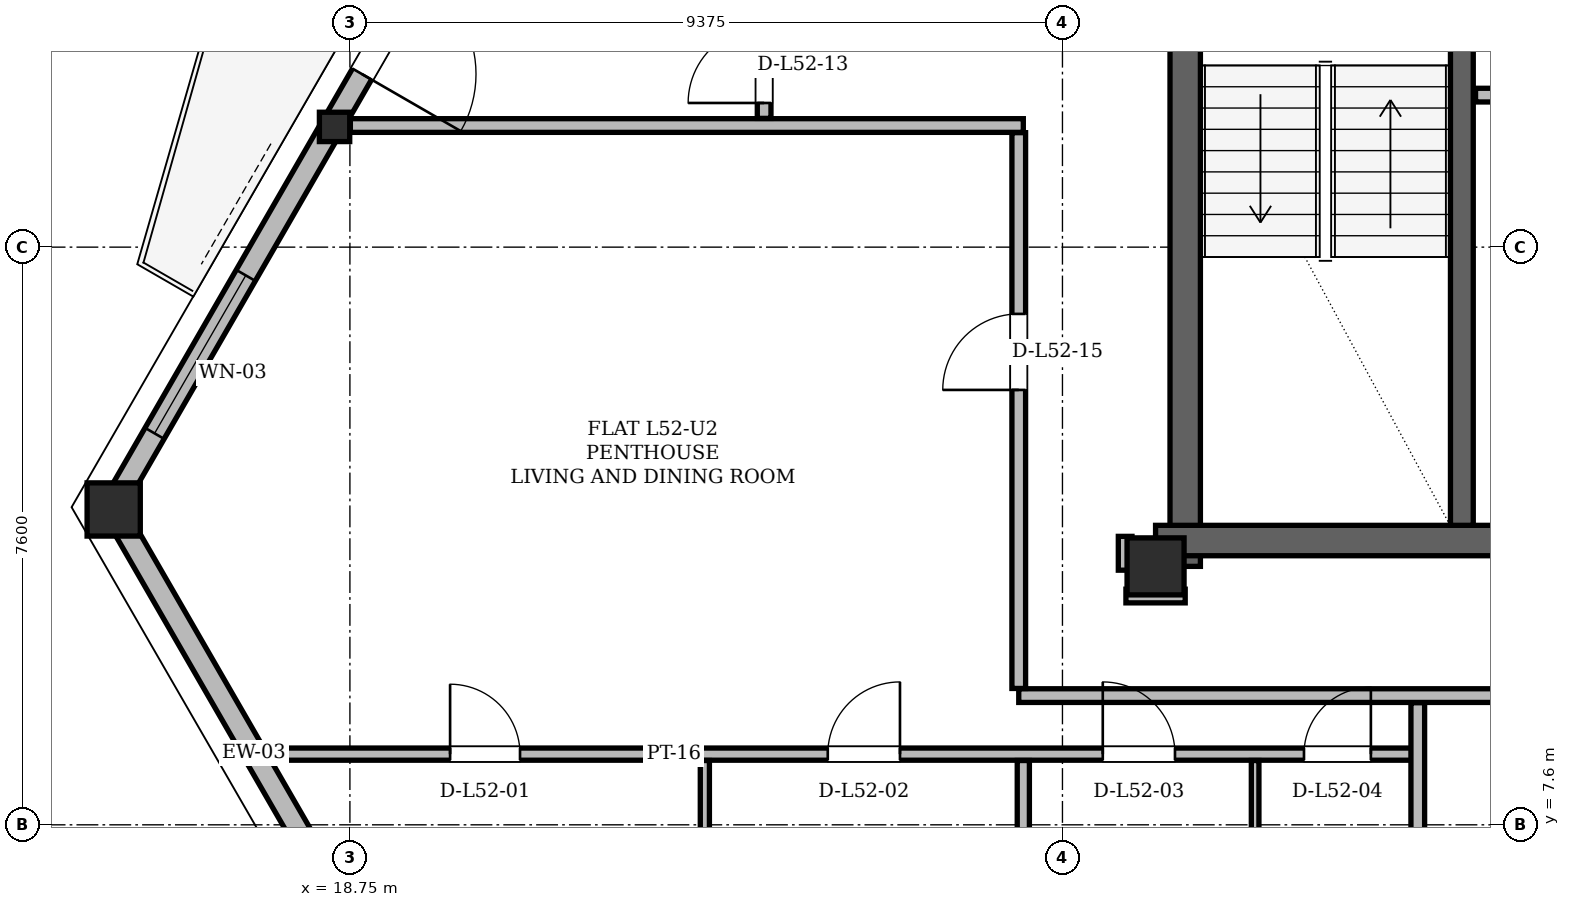
"""IFC4 building model, lengths in metres.
Left out: names, types, materials, properties, quantities, classifications, styles, units other than length and angle.
Written with IfcOpenShell. Run it as: python <this file> out.ifc"""

import sys

from ifc_helpers import new_model, si_unit, direction, frame, frame_2d, origin, origin_2d, place, context, subcontext, project, spatial, rectangle, hollow_rectangle, i_section, extrude, element, fill, save


model = new_model("IFC4")
c1 = context("Model", 3, precision=1e-05, world=origin(), true_north=direction((0.0, 1.0)))
c2 = subcontext(c1, "Body", "Model", "MODEL_VIEW")
j1 = project(units=[si_unit("LENGTHUNIT", "METRE"), si_unit("PLANEANGLEUNIT", "RADIAN")], contexts=[c1])
p1 = place(None, origin())
s1 = spatial("IfcSite", under=j1, at=p1, CompositionType="ELEMENT")
p2 = place(p1, origin())
s2 = spatial("IfcBuilding", under=s1, at=p2, CompositionType="ELEMENT")
p3 = place(p2, frame((0.0, 0.0, 197.4)))
s3 = spatial("IfcBuildingStorey", under=s2, at=p3, CompositionType="ELEMENT", Elevation=197.4)
p4 = place(p3, frame((29.35, 11.0, 0.0), z_axis=(0.0, 0.0, 1.0), x_axis=(1.0, 0.0, 0.0)))
e1 = element("IfcColumn", 1, at=p4, inside=s3, PredefinedType="COLUMN", context=c2, shape_type="SweptSolid", body=[
    extrude(hollow_rectangle(XDim=0.75, YDim=0.75, WallThickness=0.06, at=origin_2d()), origin(), (0.0, 0.0, 1.0), 3.6),
])
p5 = place(p3, frame((15.619, 11.779, 0.005), z_axis=(0.012642540595, -0.016720779496, 0.999780266709), x_axis=(0.797659331282, 0.603108274872, 0.0)))
e2 = element("IfcColumn", 2, at=p5, inside=s3, PredefinedType="COLUMN", context=c2, shape_type="SweptSolid", body=[
    extrude(hollow_rectangle(XDim=0.7, YDim=0.7, WallThickness=0.055, at=origin_2d()), origin(), (0.0, 0.0, 1.0), 3.592),
])
p6 = place(p3, frame((18.523, 16.808, 0.005), z_axis=(0.013934245024, -0.014410048513, 0.999799073473), x_axis=(0.718875400752, 0.69513894884, 0.0)))
e3 = element("IfcColumn", 3, at=p6, inside=s3, PredefinedType="COLUMN", context=c2, shape_type="SweptSolid", body=[
    extrude(i_section(OverallWidth=0.399, OverallDepth=0.386, WebThickness=0.021, FlangeThickness=0.033, at=origin_2d()), origin(), (0.0, 0.0, 1.0), 3.592),
])
p7 = place(p3, frame((29.74, 11.0, 0.0), z_axis=(0.0, 0.0, 1.0), x_axis=(0.0, 1.0, 0.0)))
e4 = element("IfcWall", 4, at=p7, inside=s3, PredefinedType="SHEAR", context=c2, shape_type="SweptSolid", body=[
    extrude(rectangle(XDim=13.3, YDim=0.4, at=frame_2d((6.65, 0.0))), origin(), (0.0, 0.0, 1.0), 3.38),
])
p8 = place(p3, frame((29.35, 11.34, 0.0), z_axis=(0.0, 0.0, 1.0), x_axis=(1.0, 0.0, 0.0)))
e5 = element("IfcWall", 5, at=p8, inside=s3, PredefinedType="SHEAR", context=c2, shape_type="SweptSolid", body=[
    extrude(rectangle(XDim=7.1, YDim=0.4, at=frame_2d((3.55, 0.0))), origin(), (0.0, 0.0, 1.0), 3.38),
])
p9 = place(p3, frame((33.38, 11.54, 0.0), z_axis=(0.0, 0.0, 1.0), x_axis=(0.0, 1.0, 0.0)))
e6 = element("IfcWall", 6, at=p9, inside=s3, PredefinedType="SHEAR", context=c2, shape_type="SweptSolid", body=[
    extrude(rectangle(XDim=7.62, YDim=0.3, at=frame_2d((3.81, 0.0))), origin(), (0.0, 0.0, 1.0), 3.38),
])
p10 = place(p3, frame((15.619, 11.779, 0.0), z_axis=(0.0, 0.0, 1.0), x_axis=(0.499999788377, -0.866025525965, 0.0)))
e7 = element("IfcWall", 7, at=p10, inside=s3, PredefinedType="SOLIDWALL", context=c2, shape_type="SweptSolid", body=[
    extrude(rectangle(XDim=7.468, YDim=0.29, at=frame_2d((3.734, 0.0))), origin(), (0.0, 0.0, 1.0), 2.677),
])
p11 = place(p3, frame((33.766, 43.21, 0.0), z_axis=(0.0, 0.0, 1.0), x_axis=(-0.499998847915, -0.86602606894, 0.0)))
e8 = element("IfcWall", 8, at=p11, inside=s3, PredefinedType="SOLIDWALL", context=c2, shape_type="SweptSolid", body=[
    extrude(rectangle(XDim=36.293, YDim=0.29, at=frame_2d((18.147, 0.0))), origin(), (0.0, 0.0, 1.0), 2.677),
])
p12 = place(p11, frame((8.034, 0.0, 0.0)))
e9 = element("IfcOpeningElement", 9, at=p12, cuts=e8, PredefinedType="OPENING", context=c2, shape_type="SweptSolid", body=[
    extrude(rectangle(XDim=1.5, YDim=2.2, at=frame_2d((0.75, 1.1))), frame((0.0, 0.145, 0.0), z_axis=(0.0, -1.0, 0.0), x_axis=(1.0, 0.0, 0.0)), (0.0, 0.0, 1.0), 0.29),
])
p13 = place(p11, frame((28.214, 0.0, 0.0)))
e10 = element("IfcOpeningElement", 10, at=p13, cuts=e8, PredefinedType="OPENING", context=c2, shape_type="SweptSolid", body=[
    extrude(rectangle(XDim=1.5, YDim=2.2, at=frame_2d((0.75, 1.1))), frame((0.0, 0.145, 0.0), z_axis=(0.0, -1.0, 0.0), x_axis=(1.0, 0.0, 0.0)), (0.0, 0.0, 1.0), 0.29),
])
p14 = place(p11, frame((32.772, 0.0, 0.85)))
e11 = element("IfcOpeningElement", 11, at=p14, cuts=e8, PredefinedType="OPENING", context=c2, shape_type="SweptSolid", body=[
    extrude(rectangle(XDim=2.4, YDim=1.717, at=frame_2d((1.2, 0.858))), frame((0.0, 0.145, 0.0), z_axis=(0.0, -1.0, 0.0), x_axis=(1.0, 0.0, 0.0)), (0.0, 0.0, 1.0), 0.29),
])
p15 = place(p11, frame((21.96, 0.0, 0.85)))
e12 = element("IfcOpeningElement", 12, at=p15, cuts=e8, PredefinedType="OPENING", context=c2, shape_type="SweptSolid", body=[
    extrude(rectangle(XDim=2.0, YDim=1.717, at=frame_2d((1.0, 0.858))), frame((0.0, 0.145, 0.0), z_axis=(0.0, -1.0, 0.0), x_axis=(1.0, 0.0, 0.0)), (0.0, 0.0, 1.0), 0.29),
])
p16 = place(p11, frame((2.382, 0.0, 0.85)))
e13 = element("IfcOpeningElement", 13, at=p16, cuts=e8, PredefinedType="OPENING", context=c2, shape_type="SweptSolid", body=[
    extrude(rectangle(XDim=1.6, YDim=1.7, at=frame_2d((0.8, 0.85))), frame((0.0, 0.145, 0.0), z_axis=(0.0, -1.0, 0.0), x_axis=(1.0, 0.0, 0.0)), (0.0, 0.0, 1.0), 0.29),
])
p17 = place(p11, frame((13.34, 0.0, 0.85)))
e14 = element("IfcOpeningElement", 14, at=p17, cuts=e8, PredefinedType="OPENING", context=c2, shape_type="SweptSolid", body=[
    extrude(rectangle(XDim=3.0, YDim=1.717, at=frame_2d((1.5, 0.858))), frame((0.0, 0.145, 0.0), z_axis=(0.0, -1.0, 0.0), x_axis=(1.0, 0.0, 0.0)), (0.0, 0.0, 1.0), 0.29),
])
p18 = place(p3, frame((33.56, 17.2, 0.0), z_axis=(0.0, 0.0, 1.0), x_axis=(1.0, 0.0, 0.0)))
e15 = element("IfcWall", 15, at=p18, inside=s3, PredefinedType="PARTITIONING", context=c2, shape_type="SweptSolid", body=[
    extrude(rectangle(XDim=2.66, YDim=0.18, at=frame_2d((1.33, 0.0))), origin(), (0.0, 0.0, 1.0), 3.38),
])
p19 = place(p3, frame((17.667, 8.53, 0.0), z_axis=(0.0, 0.0, 1.0), x_axis=(1.0, 0.0, 0.0)))
e16 = element("IfcWall", 16, at=p19, inside=s3, PredefinedType="PARTITIONING", context=c2, shape_type="SweptSolid", body=[
    extrude(rectangle(XDim=15.183, YDim=0.16, at=frame_2d((7.592, 0.0))), origin(), (0.0, 0.0, 1.0), 2.913),
])
p20 = place(p19, frame((2.401, 0.0, 0.0)))
e17 = element("IfcOpeningElement", 17, at=p20, cuts=e16, PredefinedType="OPENING", context=c2, shape_type="SweptSolid", body=[
    extrude(rectangle(XDim=0.92, YDim=2.12, at=frame_2d((0.46, 1.06))), frame((0.0, 0.08, 0.0), z_axis=(0.0, -1.0, 0.0), x_axis=(1.0, 0.0, 0.0)), (0.0, 0.0, 1.0), 0.16),
])
p21 = place(p19, frame((7.37, 0.0, 0.0)))
e18 = element("IfcOpeningElement", 18, at=p21, cuts=e16, PredefinedType="OPENING", context=c2, shape_type="SweptSolid", body=[
    extrude(rectangle(XDim=0.95, YDim=2.1, at=frame_2d((0.475, 1.05))), frame((0.0, 0.08, 0.0), z_axis=(0.0, -1.0, 0.0), x_axis=(1.0, 0.0, 0.0)), (0.0, 0.0, 1.0), 0.16),
])
p22 = place(p19, frame((10.988, 0.0, 0.0)))
e19 = element("IfcOpeningElement", 19, at=p22, cuts=e16, PredefinedType="OPENING", context=c2, shape_type="SweptSolid", body=[
    extrude(rectangle(XDim=0.95, YDim=2.1, at=frame_2d((0.475, 1.05))), frame((0.0, 0.08, 0.0), z_axis=(0.0, -1.0, 0.0), x_axis=(1.0, 0.0, 0.0)), (0.0, 0.0, 1.0), 0.16),
])
p23 = place(p19, frame((13.636, 0.0, 0.0)))
e20 = element("IfcOpeningElement", 20, at=p23, cuts=e16, PredefinedType="OPENING", context=c2, shape_type="SweptSolid", body=[
    extrude(rectangle(XDim=0.88, YDim=2.08, at=frame_2d((0.44, 1.04))), frame((0.0, 0.08, 0.0), z_axis=(0.0, -1.0, 0.0), x_axis=(1.0, 0.0, 0.0)), (0.0, 0.0, 1.0), 0.16),
])
p24 = place(p3, frame((27.55, 9.3, 0.0), z_axis=(0.0, 0.0, 1.0), x_axis=(1.0, 0.0, 0.0)))
e21 = element("IfcWall", 21, at=p24, inside=s3, PredefinedType="PARTITIONING", context=c2, shape_type="SweptSolid", body=[
    extrude(rectangle(XDim=21.25, YDim=0.18, at=frame_2d((10.625, 0.0))), origin(), (0.0, 0.0, 1.0), 2.913),
])
p25 = place(p24, frame((7.1, 0.0, 0.0)))
e22 = element("IfcOpeningElement", 22, at=p25, cuts=e21, PredefinedType="OPENING", context=c2, shape_type="SweptSolid", body=[
    extrude(rectangle(XDim=1.3, YDim=2.2, at=frame_2d((0.65, 1.1))), frame((0.0, 0.09, 0.0), z_axis=(0.0, -1.0, 0.0), x_axis=(1.0, 0.0, 0.0)), (0.0, 0.0, 1.0), 0.18),
])
p26 = place(p24, frame((18.52, 0.0, 0.0)))
e23 = element("IfcOpeningElement", 23, at=p26, cuts=e21, PredefinedType="OPENING", context=c2, shape_type="SweptSolid", body=[
    extrude(rectangle(XDim=1.0, YDim=2.18, at=frame_2d((0.5, 1.09))), frame((0.0, 0.09, 0.0), z_axis=(0.0, -1.0, 0.0), x_axis=(1.0, 0.0, 0.0)), (0.0, 0.0, 1.0), 0.18),
])
p27 = place(p3, frame((28.96, 10.61, 0.0), z_axis=(0.0, 0.0, 1.0), x_axis=(1.0, 0.0, 0.0)))
e24 = element("IfcWall", 24, at=p27, inside=s3, PredefinedType="PARTITIONING", context=c2, shape_type="SweptSolid", body=[
    extrude(rectangle(XDim=0.78, YDim=0.18, at=frame_2d((0.39, 0.0))), origin(), (0.0, 0.0, 1.0), 3.38),
])
p28 = place(p3, frame((18.756, 16.8, 0.0), z_axis=(0.0, 0.0, 1.0), x_axis=(1.0, 0.0, 0.0)))
e25 = element("IfcWall", 25, at=p28, inside=s3, PredefinedType="PARTITIONING", context=c2, shape_type="SweptSolid", body=[
    extrude(rectangle(XDim=8.854, YDim=0.18, at=frame_2d((4.427, 0.0))), origin(), (0.0, 0.0, 1.0), 3.38),
])
p29 = place(p3, frame((23.42, 5.46, 0.0), z_axis=(0.0, 0.0, 1.0), x_axis=(0.0, 1.0, 0.0)))
e26 = element("IfcWall", 26, at=p29, inside=s3, PredefinedType="PARTITIONING", context=c2, shape_type="SweptSolid", body=[
    extrude(rectangle(XDim=2.986, YDim=0.12, at=frame_2d((1.493, 0.0))), origin(), (0.0, 0.0, 1.0), 2.913),
])
p30 = place(p3, frame((24.2, 16.894, 0.0), z_axis=(0.0, 0.0, 1.0), x_axis=(0.0, 1.0, 0.0)))
e27 = element("IfcWall", 27, at=p30, inside=s3, PredefinedType="PARTITIONING", context=c2, shape_type="SweptSolid", body=[
    extrude(rectangle(XDim=1.462, YDim=0.18, at=frame_2d((0.731, 0.0))), origin(), (0.0, 0.0, 1.0), 3.38),
])
p31 = place(p30, frame((0.203, 0.0, 0.0)))
e28 = element("IfcOpeningElement", 28, at=p31, cuts=e27, PredefinedType="OPENING", context=c2, shape_type="SweptSolid", body=[
    extrude(rectangle(XDim=1.0, YDim=2.18, at=frame_2d((0.5, 1.09))), frame((0.0, 0.09, 0.0), z_axis=(0.0, -1.0, 0.0), x_axis=(1.0, 0.0, 0.0)), (0.0, 0.0, 1.0), 0.18),
])
p32 = place(p3, frame((27.55, 9.394, 0.0), z_axis=(0.0, 0.0, 1.0), x_axis=(0.0, 1.0, 0.0)))
e29 = element("IfcWall", 29, at=p32, inside=s3, PredefinedType="PARTITIONING", context=c2, shape_type="SweptSolid", body=[
    extrude(rectangle(XDim=7.312, YDim=0.18, at=frame_2d((3.656, 0.0))), origin(), (0.0, 0.0, 1.0), 2.913),
])
p33 = place(p32, frame((3.927, 0.0, 0.0)))
e30 = element("IfcOpeningElement", 30, at=p33, cuts=e29, PredefinedType="OPENING", context=c2, shape_type="SweptSolid", body=[
    extrude(rectangle(XDim=1.0, YDim=2.18, at=frame_2d((0.5, 1.09))), frame((0.0, 0.09, 0.0), z_axis=(0.0, -1.0, 0.0), x_axis=(1.0, 0.0, 0.0)), (0.0, 0.0, 1.0), 0.18),
])
p34 = place(p3, frame((27.61, 5.46, 0.0), z_axis=(0.0, 0.0, 1.0), x_axis=(0.0, 1.0, 0.0)))
e31 = element("IfcWall", 31, at=p34, inside=s3, PredefinedType="PARTITIONING", context=c2, shape_type="SweptSolid", body=[
    extrude(rectangle(XDim=2.986, YDim=0.16, at=frame_2d((1.493, 0.0))), origin(), (0.0, 0.0, 1.0), 2.966),
])
p35 = place(p3, frame((28.95, 10.95, 0.0), z_axis=(0.0, 0.0, 1.0), x_axis=(0.0, 1.0, 0.0)))
e32 = element("IfcWall", 32, at=p35, inside=s3, PredefinedType="PARTITIONING", context=c2, shape_type="SweptSolid", body=[
    extrude(rectangle(XDim=0.445, YDim=0.18, at=frame_2d((0.223, 0.0))), origin(), (0.0, 0.0, 1.0), 2.913),
])
p36 = place(p3, frame((30.66, 5.46, 0.0), z_axis=(0.0, 0.0, 1.0), x_axis=(0.0, 1.0, 0.0)))
e33 = element("IfcWall", 33, at=p36, inside=s3, PredefinedType="PARTITIONING", context=c2, shape_type="SweptSolid", body=[
    extrude(rectangle(XDim=2.986, YDim=0.1, at=frame_2d((1.493, 0.0))), origin(), (0.0, 0.0, 1.0), 2.966),
])
p37 = place(p3, frame((32.8, 5.46, 0.0), z_axis=(0.0, 0.0, 1.0), x_axis=(0.0, 1.0, 0.0)))
e34 = element("IfcWall", 34, at=p37, inside=s3, PredefinedType="PARTITIONING", context=c2, shape_type="SweptSolid", body=[
    extrude(rectangle(XDim=3.746, YDim=0.18, at=frame_2d((1.873, 0.0))), origin(), (0.0, 0.0, 1.0), 2.966),
])
p38 = place(p13, origin())
e35 = element("IfcDoor", 35, at=p38, inside=s3, OperationType="SINGLE_SWING_RIGHT", PredefinedType="DOOR", context=c2, shape_type="SweptSolid", body=[
    extrude(rectangle(XDim=1.5, YDim=2.2, at=frame_2d((0.75, 1.1))), frame((0.0, 0.025, 0.0), z_axis=(0.0, -1.0, 0.0), x_axis=(1.0, 0.0, 0.0)), (0.0, 0.0, 1.0), 0.05),
])
fill(e10, e35)
p39 = place(p14, origin())
e36 = element("IfcWindow", 36, at=p39, inside=s3, PartitioningType="SINGLE_PANEL", PredefinedType="WINDOW", context=c2, shape_type="SweptSolid", body=[
    extrude(rectangle(XDim=2.4, YDim=1.717, at=frame_2d((1.2, 0.858))), frame((0.0, 0.03, 0.0), z_axis=(0.0, -1.0, 0.0), x_axis=(1.0, 0.0, 0.0)), (0.0, 0.0, 1.0), 0.06),
])
fill(e11, e36)
p40 = place(p20, origin())
e37 = element("IfcDoor", 37, at=p40, inside=s3, OperationType="SINGLE_SWING_LEFT", PredefinedType="DOOR", context=c2, shape_type="SweptSolid", body=[
    extrude(rectangle(XDim=0.92, YDim=2.12, at=frame_2d((0.46, 1.06))), frame((0.0, 0.025, 0.0), z_axis=(0.0, -1.0, 0.0), x_axis=(1.0, 0.0, 0.0)), (0.0, 0.0, 1.0), 0.05),
])
fill(e17, e37)
p41 = place(p21, origin())
e38 = element("IfcDoor", 38, at=p41, inside=s3, OperationType="SINGLE_SWING_RIGHT", PredefinedType="DOOR", context=c2, shape_type="SweptSolid", body=[
    extrude(rectangle(XDim=0.95, YDim=2.1, at=frame_2d((0.475, 1.05))), frame((0.0, 0.025, 0.0), z_axis=(0.0, -1.0, 0.0), x_axis=(1.0, 0.0, 0.0)), (0.0, 0.0, 1.0), 0.05),
])
fill(e18, e38)
p42 = place(p22, origin())
e39 = element("IfcDoor", 39, at=p42, inside=s3, OperationType="SINGLE_SWING_LEFT", PredefinedType="DOOR", context=c2, shape_type="SweptSolid", body=[
    extrude(rectangle(XDim=0.95, YDim=2.1, at=frame_2d((0.475, 1.05))), frame((0.0, 0.025, 0.0), z_axis=(0.0, -1.0, 0.0), x_axis=(1.0, 0.0, 0.0)), (0.0, 0.0, 1.0), 0.05),
])
fill(e19, e39)
p43 = place(p23, origin())
e40 = element("IfcDoor", 40, at=p43, inside=s3, OperationType="SINGLE_SWING_RIGHT", PredefinedType="DOOR", context=c2, shape_type="SweptSolid", body=[
    extrude(rectangle(XDim=0.88, YDim=2.08, at=frame_2d((0.44, 1.04))), frame((0.0, 0.025, 0.0), z_axis=(0.0, -1.0, 0.0), x_axis=(1.0, 0.0, 0.0)), (0.0, 0.0, 1.0), 0.05),
])
fill(e20, e40)
p44 = place(p31, origin())
e41 = element("IfcDoor", 41, at=p44, inside=s3, OperationType="SINGLE_SWING_LEFT", PredefinedType="DOOR", context=c2, shape_type="SweptSolid", body=[
    extrude(rectangle(XDim=1.0, YDim=2.18, at=frame_2d((0.5, 1.09))), frame((0.0, 0.025, 0.0), z_axis=(0.0, -1.0, 0.0), x_axis=(1.0, 0.0, 0.0)), (0.0, 0.0, 1.0), 0.05),
])
fill(e28, e41)
p45 = place(p33, origin())
e42 = element("IfcDoor", 42, at=p45, inside=s3, OperationType="SINGLE_SWING_LEFT", PredefinedType="DOOR", context=c2, shape_type="SweptSolid", body=[
    extrude(rectangle(XDim=1.0, YDim=2.18, at=frame_2d((0.5, 1.09))), frame((0.0, 0.025, 0.0), z_axis=(0.0, -1.0, 0.0), x_axis=(1.0, 0.0, 0.0)), (0.0, 0.0, 1.0), 0.05),
])
fill(e30, e42)
save(model, sys.argv[1])
